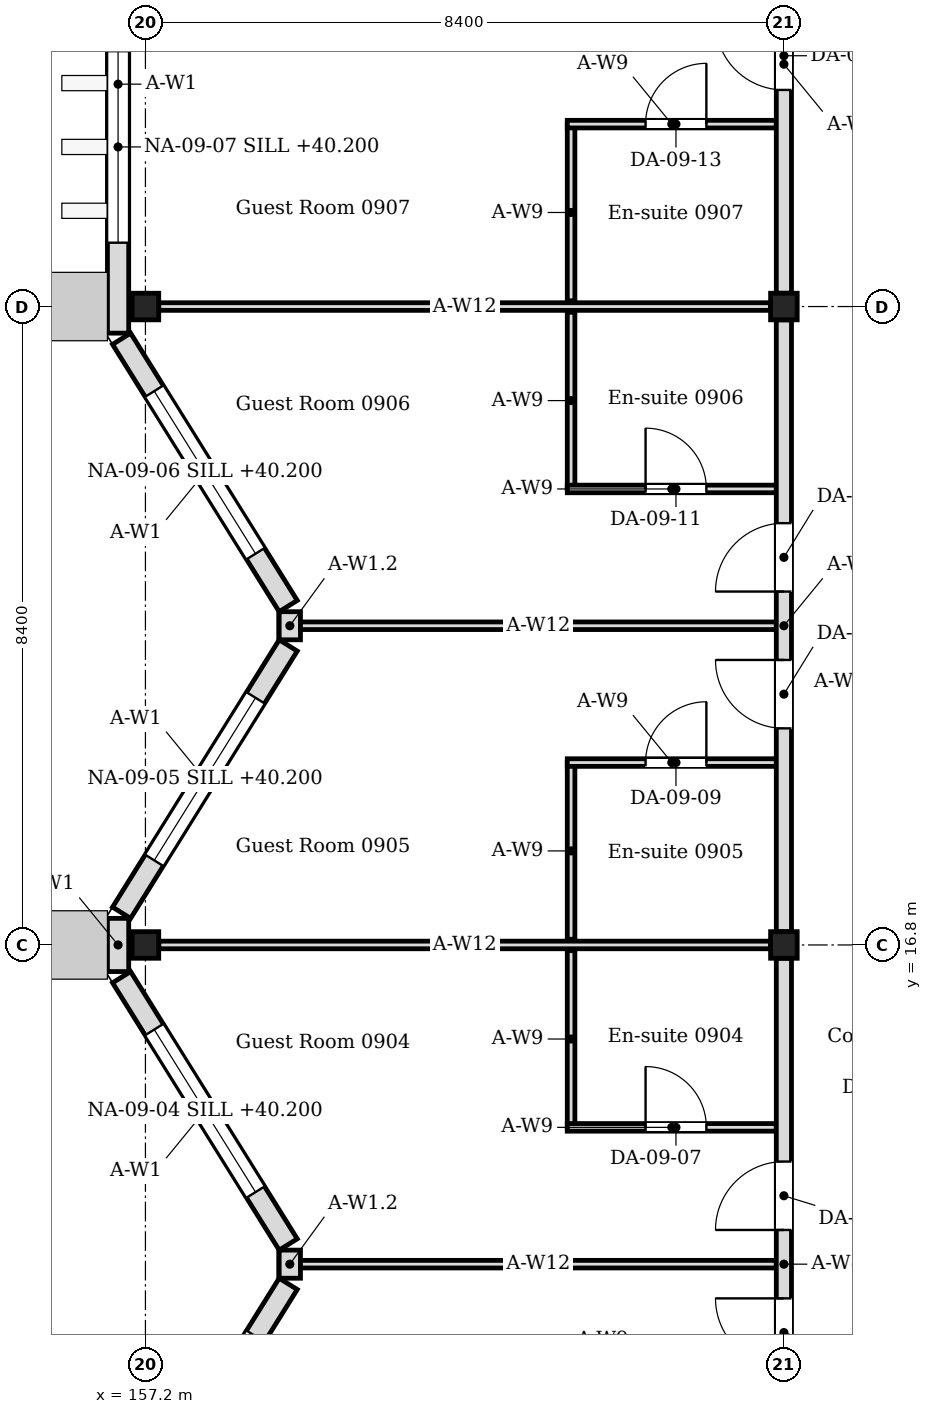
"""IFC4 building model, lengths in metres.
Left out: names, types, materials, properties, quantities, classifications, styles, units other than length and angle.
Written with IfcOpenShell. Run it as: python <this file> out.ifc"""

import sys

from ifc_helpers import new_model, si_unit, direction, frame, frame_2d, origin, origin_2d, place, context, subcontext, project, spatial, rectangle, i_section, extrude, element, fill, save


model = new_model("IFC4")
c1 = context("Model", 3, precision=1e-05, world=origin(), true_north=direction((0.0, 1.0)))
c2 = subcontext(c1, "Body", "Model", "MODEL_VIEW")
j1 = project(units=[si_unit("LENGTHUNIT", "METRE"), si_unit("PLANEANGLEUNIT", "RADIAN")], contexts=[c1])
p1 = place(None, origin())
s1 = spatial("IfcSite", under=j1, at=p1, CompositionType="ELEMENT")
p2 = place(p1, origin())
s2 = spatial("IfcBuilding", under=s1, at=p2, CompositionType="ELEMENT")
p3 = place(p2, frame((0.0, 0.0, 39.6)))
s3 = spatial("IfcBuildingStorey", under=s2, at=p3, CompositionType="ELEMENT", Elevation=39.6)
for number, where, z_axis, x_axis in (
    (1, (157.2, 16.8, 0.0), (0.0, 0.0, 1.0), (1.0, 0.0, 0.0)),
    (2, (157.2, 25.2, 0.0), (0.0, 0.0, 1.0), (1.0, 0.0, 0.0)),
    (3, (165.6, 16.8, 0.0), (0.0, 0.0, 1.0), (1.0, 0.0, 0.0)),
    (4, (165.6, 25.2, 0.0), (0.0, 0.0, 1.0), (1.0, 0.0, 0.0)),
):
    element("IfcColumn", number, at=place(p3, frame(where, z_axis=z_axis, x_axis=x_axis)), inside=s3, PredefinedType="COLUMN", context=c2, shape_type="SweptSolid", body=[
        extrude(i_section(OverallWidth=0.35, OverallDepth=0.35, WebThickness=0.012, FlangeThickness=0.019, FilletRadius=0.013, at=origin_2d()), origin(), (0.0, 0.0, 1.0), 4.2),
    ])
p4 = place(p3, frame((156.886, 8.824, 0.0), z_axis=(0.0, 0.0, 1.0), x_axis=(0.529018946142, 0.848610013271, 0.0)))
e5 = element("IfcWall", 5, at=p4, inside=s3, PredefinedType="SOLIDWALL", context=c2, shape_type="SweptSolid", body=[
    extrude(rectangle(XDim=4.144, YDim=0.28, at=frame_2d((2.072, 0.0))), origin(), (0.0, 0.0, 1.0), 4.05),
])
p5 = place(p4, frame((0.812, 0.0, 0.6)))
e6 = element("IfcOpeningElement", 6, at=p5, cuts=e5, PredefinedType="OPENING", context=c2, shape_type="SweptSolid", body=[
    extrude(rectangle(XDim=2.52, YDim=2.4, at=frame_2d((1.26, 1.2))), frame((0.0, 0.15, 0.0), z_axis=(0.0, -1.0, 0.0), x_axis=(1.0, 0.0, 0.0)), (0.0, 0.0, 1.0), 0.3),
])
p6 = place(p3, frame((159.079, 12.859, 0.0), z_axis=(0.0, 0.0, 1.0), x_axis=(-0.528992500338, 0.848626498871, 0.0)))
e7 = element("IfcWall", 7, at=p6, inside=s3, PredefinedType="SOLIDWALL", context=c2, shape_type="SweptSolid", body=[
    extrude(rectangle(XDim=4.145, YDim=0.28, at=frame_2d((2.072, 0.0))), origin(), (0.0, 0.0, 1.0), 4.05),
])
p7 = place(p6, frame((0.812, 0.0, 0.6)))
e8 = element("IfcOpeningElement", 8, at=p7, cuts=e7, PredefinedType="OPENING", context=c2, shape_type="SweptSolid", body=[
    extrude(rectangle(XDim=2.52, YDim=2.4, at=frame_2d((1.26, 1.2))), frame((0.0, 0.15, 0.0), z_axis=(0.0, -1.0, 0.0), x_axis=(1.0, 0.0, 0.0)), (0.0, 0.0, 1.0), 0.3),
])
p8 = place(p3, frame((159.1, 12.415, 0.0), z_axis=(0.0, 0.0, 1.0), x_axis=(0.0, 1.0, 0.0)))
e9 = element("IfcWall", 9, at=p8, inside=s3, PredefinedType="SOLIDWALL", context=c2, shape_type="SweptSolid", body=[
    extrude(rectangle(XDim=0.37, YDim=0.28, at=frame_2d((0.185, 0.0))), origin(), (0.0, 0.0, 1.0), 3.604),
])
p9 = place(p3, frame((156.84, 16.45, 0.0), z_axis=(0.0, 0.0, 1.0), x_axis=(0.0, 1.0, 0.0)))
e10 = element("IfcWall", 10, at=p9, inside=s3, PredefinedType="SOLIDWALL", context=c2, shape_type="SweptSolid", body=[
    extrude(rectangle(XDim=0.7, YDim=0.28, at=frame_2d((0.35, 0.0))), origin(), (0.0, 0.0, 1.0), 4.05),
])
p10 = place(p3, frame((156.886, 17.224, 0.0), z_axis=(0.0, 0.0, 1.0), x_axis=(0.529018946142, 0.848610013271, 0.0)))
e11 = element("IfcWall", 11, at=p10, inside=s3, PredefinedType="SOLIDWALL", context=c2, shape_type="SweptSolid", body=[
    extrude(rectangle(XDim=4.144, YDim=0.28, at=frame_2d((2.072, 0.0))), origin(), (0.0, 0.0, 1.0), 4.05),
])
p11 = place(p10, frame((0.812, 0.0, 0.6)))
e12 = element("IfcOpeningElement", 12, at=p11, cuts=e11, PredefinedType="OPENING", context=c2, shape_type="SweptSolid", body=[
    extrude(rectangle(XDim=2.52, YDim=2.4, at=frame_2d((1.26, 1.2))), frame((0.0, 0.15, 0.0), z_axis=(0.0, -1.0, 0.0), x_axis=(1.0, 0.0, 0.0)), (0.0, 0.0, 1.0), 0.3),
])
p12 = place(p3, frame((159.079, 21.259, 0.0), z_axis=(0.0, 0.0, 1.0), x_axis=(-0.529018946142, 0.848610013271, 0.0)))
e13 = element("IfcWall", 13, at=p12, inside=s3, PredefinedType="SOLIDWALL", context=c2, shape_type="SweptSolid", body=[
    extrude(rectangle(XDim=4.144, YDim=0.28, at=frame_2d((2.072, 0.0))), origin(), (0.0, 0.0, 1.0), 4.05),
])
p13 = place(p12, frame((0.812, 0.0, 0.6)))
e14 = element("IfcOpeningElement", 14, at=p13, cuts=e13, PredefinedType="OPENING", context=c2, shape_type="SweptSolid", body=[
    extrude(rectangle(XDim=2.52, YDim=2.4, at=frame_2d((1.26, 1.2))), frame((0.0, 0.15, 0.0), z_axis=(0.0, -1.0, 0.0), x_axis=(1.0, 0.0, 0.0)), (0.0, 0.0, 1.0), 0.3),
])
p14 = place(p3, frame((159.1, 20.815, 0.0), z_axis=(0.0, 0.0, 1.0), x_axis=(0.0, 1.0, 0.0)))
e15 = element("IfcWall", 15, at=p14, inside=s3, PredefinedType="SOLIDWALL", context=c2, shape_type="SweptSolid", body=[
    extrude(rectangle(XDim=0.37, YDim=0.28, at=frame_2d((0.185, 0.0))), origin(), (0.0, 0.0, 1.0), 3.604),
])
p15 = place(p3, frame((156.84, 24.85, 0.0), z_axis=(0.0, 0.0, 1.0), x_axis=(0.0, 1.0, 0.0)))
e16 = element("IfcWall", 16, at=p15, inside=s3, PredefinedType="SOLIDWALL", context=c2, shape_type="SweptSolid", body=[
    extrude(rectangle(XDim=9.1, YDim=0.28, at=frame_2d((4.55, 0.0))), origin(), (0.0, 0.0, 1.0), 4.05),
])
p16 = place(p15, frame((1.19, 0.0, 0.6)))
e17 = element("IfcOpeningElement", 17, at=p16, cuts=e16, PredefinedType="OPENING", context=c2, shape_type="SweptSolid", body=[
    extrude(rectangle(XDim=2.52, YDim=2.4, at=frame_2d((1.26, 1.2))), frame((0.0, 0.15, 0.0), z_axis=(0.0, -1.0, 0.0), x_axis=(1.0, 0.0, 0.0)), (0.0, 0.0, 1.0), 0.3),
])
p17 = place(p15, frame((5.39, 0.0, 0.6)))
e18 = element("IfcOpeningElement", 18, at=p17, cuts=e16, PredefinedType="OPENING", context=c2, shape_type="SweptSolid", body=[
    extrude(rectangle(XDim=2.52, YDim=2.4, at=frame_2d((1.26, 1.2))), frame((0.0, 0.15, 0.0), z_axis=(0.0, -1.0, 0.0), x_axis=(1.0, 0.0, 0.0)), (0.0, 0.0, 1.0), 0.3),
])
p18 = place(p3, frame((162.8, 14.4, 0.0), z_axis=(0.0, 0.0, 1.0), x_axis=(0.0, 1.0, 0.0)))
e19 = element("IfcWall", 19, at=p18, inside=s3, PredefinedType="PARTITIONING", context=c2, shape_type="SweptSolid", body=[
    extrude(rectangle(XDim=2.325, YDim=0.1, at=frame_2d((1.163, 0.0))), origin(), (0.0, 0.0, 1.0), 4.05),
])
p19 = place(p3, frame((162.75, 14.4, 0.0), z_axis=(0.0, 0.0, 1.0), x_axis=(1.0, 0.0, 0.0)))
e20 = element("IfcWall", 20, at=p19, inside=s3, PredefinedType="PARTITIONING", context=c2, shape_type="SweptSolid", body=[
    extrude(rectangle(XDim=2.75, YDim=0.1, at=frame_2d((1.375, 0.0))), origin(), (0.0, 0.0, 1.0), 4.05),
])
p20 = place(p19, frame((1.03, 0.0, 0.0)))
e21 = element("IfcOpeningElement", 21, at=p20, cuts=e20, PredefinedType="OPENING", context=c2, shape_type="SweptSolid", body=[
    extrude(rectangle(XDim=0.8, YDim=2.1, at=frame_2d((0.4, 1.05))), frame((0.0, 0.06, 0.0), z_axis=(0.0, -1.0, 0.0), x_axis=(1.0, 0.0, 0.0)), (0.0, 0.0, 1.0), 0.12),
])
p21 = place(p3, frame((162.8, 16.875, 0.0), z_axis=(0.0, 0.0, 1.0), x_axis=(0.0, 1.0, 0.0)))
e22 = element("IfcWall", 22, at=p21, inside=s3, PredefinedType="PARTITIONING", context=c2, shape_type="SweptSolid", body=[
    extrude(rectangle(XDim=2.325, YDim=0.1, at=frame_2d((1.163, 0.0))), origin(), (0.0, 0.0, 1.0), 4.05),
])
p22 = place(p3, frame((162.75, 19.2, 0.0), z_axis=(0.0, 0.0, 1.0), x_axis=(1.0, 0.0, 0.0)))
e23 = element("IfcWall", 23, at=p22, inside=s3, PredefinedType="PARTITIONING", context=c2, shape_type="SweptSolid", body=[
    extrude(rectangle(XDim=2.75, YDim=0.1, at=frame_2d((1.375, 0.0))), origin(), (0.0, 0.0, 1.0), 4.05),
])
p23 = place(p22, frame((1.03, 0.0, 0.0)))
e24 = element("IfcOpeningElement", 24, at=p23, cuts=e23, PredefinedType="OPENING", context=c2, shape_type="SweptSolid", body=[
    extrude(rectangle(XDim=0.8, YDim=2.1, at=frame_2d((0.4, 1.05))), frame((0.0, 0.06, 0.0), z_axis=(0.0, -1.0, 0.0), x_axis=(1.0, 0.0, 0.0)), (0.0, 0.0, 1.0), 0.12),
])
p24 = place(p3, frame((162.8, 22.8, 0.0), z_axis=(0.0, 0.0, 1.0), x_axis=(0.0, 1.0, 0.0)))
e25 = element("IfcWall", 25, at=p24, inside=s3, PredefinedType="PARTITIONING", context=c2, shape_type="SweptSolid", body=[
    extrude(rectangle(XDim=2.325, YDim=0.1, at=frame_2d((1.163, 0.0))), origin(), (0.0, 0.0, 1.0), 4.05),
])
p25 = place(p3, frame((162.75, 22.8, 0.0), z_axis=(0.0, 0.0, 1.0), x_axis=(1.0, 0.0, 0.0)))
e26 = element("IfcWall", 26, at=p25, inside=s3, PredefinedType="PARTITIONING", context=c2, shape_type="SweptSolid", body=[
    extrude(rectangle(XDim=2.75, YDim=0.1, at=frame_2d((1.375, 0.0))), origin(), (0.0, 0.0, 1.0), 4.05),
])
p26 = place(p25, frame((1.03, 0.0, 0.0)))
e27 = element("IfcOpeningElement", 27, at=p26, cuts=e26, PredefinedType="OPENING", context=c2, shape_type="SweptSolid", body=[
    extrude(rectangle(XDim=0.8, YDim=2.1, at=frame_2d((0.4, 1.05))), frame((0.0, 0.06, 0.0), z_axis=(0.0, -1.0, 0.0), x_axis=(1.0, 0.0, 0.0)), (0.0, 0.0, 1.0), 0.12),
])
p27 = place(p3, frame((162.8, 25.275, 0.0), z_axis=(0.0, 0.0, 1.0), x_axis=(0.0, 1.0, 0.0)))
e28 = element("IfcWall", 28, at=p27, inside=s3, PredefinedType="PARTITIONING", context=c2, shape_type="SweptSolid", body=[
    extrude(rectangle(XDim=2.325, YDim=0.1, at=frame_2d((1.163, 0.0))), origin(), (0.0, 0.0, 1.0), 4.05),
])
p28 = place(p3, frame((162.75, 27.6, 0.0), z_axis=(0.0, 0.0, 1.0), x_axis=(1.0, 0.0, 0.0)))
e29 = element("IfcWall", 29, at=p28, inside=s3, PredefinedType="PARTITIONING", context=c2, shape_type="SweptSolid", body=[
    extrude(rectangle(XDim=2.75, YDim=0.1, at=frame_2d((1.375, 0.0))), origin(), (0.0, 0.0, 1.0), 4.05),
])
p29 = place(p28, frame((1.03, 0.0, 0.0)))
e30 = element("IfcOpeningElement", 30, at=p29, cuts=e29, PredefinedType="OPENING", context=c2, shape_type="SweptSolid", body=[
    extrude(rectangle(XDim=0.8, YDim=2.1, at=frame_2d((0.4, 1.05))), frame((0.0, 0.06, 0.0), z_axis=(0.0, -1.0, 0.0), x_axis=(1.0, 0.0, 0.0)), (0.0, 0.0, 1.0), 0.12),
])
for number, where, z_axis, x_axis in (
    (31, (157.375, 16.8, 0.0), (0.0, 0.0, 1.0), (1.0, 0.0, 0.0)),
    (32, (157.375, 25.2, 0.0), (0.0, 0.0, 1.0), (1.0, 0.0, 0.0)),
):
    element("IfcWall", number, at=place(p3, frame(where, z_axis=z_axis, x_axis=x_axis)), inside=s3, PredefinedType="PARTITIONING", context=c2, shape_type="SweptSolid", body=[
        extrude(rectangle(XDim=8.05, YDim=0.1, at=frame_2d((4.025, 0.0))), origin(), (0.0, 0.0, 1.0), 3.604),
    ])
for number, where, z_axis, x_axis in (
    (33, (159.24, 12.6, 0.0), (0.0, 0.0, 1.0), (1.0, 0.0, 0.0)),
    (34, (159.24, 21.0, 0.0), (0.0, 0.0, 1.0), (1.0, 0.0, 0.0)),
):
    element("IfcWall", number, at=place(p3, frame(where, z_axis=z_axis, x_axis=x_axis)), inside=s3, PredefinedType="PARTITIONING", context=c2, shape_type="SweptSolid", body=[
        extrude(rectangle(XDim=6.26, YDim=0.1, at=frame_2d((3.13, 0.0))), origin(), (0.0, 0.0, 1.0), 3.604),
    ])
p30 = place(p3, frame((165.6, 8.575, 0.0), z_axis=(0.0, 0.0, 1.0), x_axis=(0.0, 1.0, 0.0)))
e35 = element("IfcWall", 35, at=p30, inside=s3, PredefinedType="PARTITIONING", context=c2, shape_type="SweptSolid", body=[
    extrude(rectangle(XDim=8.05, YDim=0.2, at=frame_2d((4.025, 0.0))), origin(), (0.0, 0.0, 1.0), 3.45),
])
p31 = place(p30, frame((2.675, 0.0, 0.0)))
e36 = element("IfcOpeningElement", 36, at=p31, cuts=e35, PredefinedType="OPENING", context=c2, shape_type="SweptSolid", body=[
    extrude(rectangle(XDim=0.9, YDim=2.1, at=frame_2d((0.45, 1.05))), frame((0.0, 0.11, 0.0), z_axis=(0.0, -1.0, 0.0), x_axis=(1.0, 0.0, 0.0)), (0.0, 0.0, 1.0), 0.22),
])
p32 = place(p30, frame((4.475, 0.0, 0.0)))
e37 = element("IfcOpeningElement", 37, at=p32, cuts=e35, PredefinedType="OPENING", context=c2, shape_type="SweptSolid", body=[
    extrude(rectangle(XDim=0.9, YDim=2.1, at=frame_2d((0.45, 1.05))), frame((0.0, 0.11, 0.0), z_axis=(0.0, -1.0, 0.0), x_axis=(1.0, 0.0, 0.0)), (0.0, 0.0, 1.0), 0.22),
])
p33 = place(p3, frame((165.6, 16.975, 0.0), z_axis=(0.0, 0.0, 1.0), x_axis=(0.0, 1.0, 0.0)))
e38 = element("IfcWall", 38, at=p33, inside=s3, PredefinedType="PARTITIONING", context=c2, shape_type="SweptSolid", body=[
    extrude(rectangle(XDim=8.05, YDim=0.2, at=frame_2d((4.025, 0.0))), origin(), (0.0, 0.0, 1.0), 3.45),
])
p34 = place(p33, frame((2.675, 0.0, 0.0)))
e39 = element("IfcOpeningElement", 39, at=p34, cuts=e38, PredefinedType="OPENING", context=c2, shape_type="SweptSolid", body=[
    extrude(rectangle(XDim=0.9, YDim=2.1, at=frame_2d((0.45, 1.05))), frame((0.0, 0.11, 0.0), z_axis=(0.0, -1.0, 0.0), x_axis=(1.0, 0.0, 0.0)), (0.0, 0.0, 1.0), 0.22),
])
p35 = place(p33, frame((4.475, 0.0, 0.0)))
e40 = element("IfcOpeningElement", 40, at=p35, cuts=e38, PredefinedType="OPENING", context=c2, shape_type="SweptSolid", body=[
    extrude(rectangle(XDim=0.9, YDim=2.1, at=frame_2d((0.45, 1.05))), frame((0.0, 0.11, 0.0), z_axis=(0.0, -1.0, 0.0), x_axis=(1.0, 0.0, 0.0)), (0.0, 0.0, 1.0), 0.22),
])
p36 = place(p3, frame((165.6, 25.375, 0.0), z_axis=(0.0, 0.0, 1.0), x_axis=(0.0, 1.0, 0.0)))
e41 = element("IfcWall", 41, at=p36, inside=s3, PredefinedType="PARTITIONING", context=c2, shape_type="SweptSolid", body=[
    extrude(rectangle(XDim=8.05, YDim=0.2, at=frame_2d((4.025, 0.0))), origin(), (0.0, 0.0, 1.0), 3.45),
])
p37 = place(p36, frame((2.675, 0.0, 0.0)))
e42 = element("IfcOpeningElement", 42, at=p37, cuts=e41, PredefinedType="OPENING", context=c2, shape_type="SweptSolid", body=[
    extrude(rectangle(XDim=0.9, YDim=2.1, at=frame_2d((0.45, 1.05))), frame((0.0, 0.11, 0.0), z_axis=(0.0, -1.0, 0.0), x_axis=(1.0, 0.0, 0.0)), (0.0, 0.0, 1.0), 0.22),
])
p38 = place(p36, frame((4.475, 0.0, 0.0)))
e43 = element("IfcOpeningElement", 43, at=p38, cuts=e41, PredefinedType="OPENING", context=c2, shape_type="SweptSolid", body=[
    extrude(rectangle(XDim=0.9, YDim=2.1, at=frame_2d((0.45, 1.05))), frame((0.0, 0.11, 0.0), z_axis=(0.0, -1.0, 0.0), x_axis=(1.0, 0.0, 0.0)), (0.0, 0.0, 1.0), 0.22),
])
p39 = place(p7, origin())
e44 = element("IfcWindow", 44, at=p39, inside=s3, PartitioningType="SINGLE_PANEL", PredefinedType="WINDOW", context=c2, shape_type="SweptSolid", body=[
    extrude(rectangle(XDim=2.52, YDim=2.4, at=frame_2d((1.26, 1.2))), frame((0.0, 0.03, 0.0), z_axis=(0.0, -1.0, 0.0), x_axis=(1.0, 0.0, 0.0)), (0.0, 0.0, 1.0), 0.06),
])
fill(e8, e44)
p40 = place(p11, origin())
e45 = element("IfcWindow", 45, at=p40, inside=s3, PartitioningType="SINGLE_PANEL", PredefinedType="WINDOW", context=c2, shape_type="SweptSolid", body=[
    extrude(rectangle(XDim=2.52, YDim=2.4, at=frame_2d((1.26, 1.2))), frame((0.0, 0.03, 0.0), z_axis=(0.0, -1.0, 0.0), x_axis=(1.0, 0.0, 0.0)), (0.0, 0.0, 1.0), 0.06),
])
fill(e12, e45)
p41 = place(p13, origin())
e46 = element("IfcWindow", 46, at=p41, inside=s3, PartitioningType="SINGLE_PANEL", PredefinedType="WINDOW", context=c2, shape_type="SweptSolid", body=[
    extrude(rectangle(XDim=2.52, YDim=2.4, at=frame_2d((1.26, 1.2))), frame((0.0, 0.03, 0.0), z_axis=(0.0, -1.0, 0.0), x_axis=(1.0, 0.0, 0.0)), (0.0, 0.0, 1.0), 0.06),
])
fill(e14, e46)
p42 = place(p16, origin())
e47 = element("IfcWindow", 47, at=p42, inside=s3, PartitioningType="SINGLE_PANEL", PredefinedType="WINDOW", context=c2, shape_type="SweptSolid", body=[
    extrude(rectangle(XDim=2.52, YDim=2.4, at=frame_2d((1.26, 1.2))), frame((0.0, 0.03, 0.0), z_axis=(0.0, -1.0, 0.0), x_axis=(1.0, 0.0, 0.0)), (0.0, 0.0, 1.0), 0.06),
])
fill(e17, e47)
p43 = place(p31, origin())
e48 = element("IfcDoor", 48, at=p43, inside=s3, OperationType="SINGLE_SWING_RIGHT", PredefinedType="DOOR", context=c2, shape_type="SweptSolid", body=[
    extrude(rectangle(XDim=0.9, YDim=2.1, at=frame_2d((0.45, 1.05))), frame((0.0, 0.025, 0.0), z_axis=(0.0, -1.0, 0.0), x_axis=(1.0, 0.0, 0.0)), (0.0, 0.0, 1.0), 0.05),
])
fill(e36, e48)
p44 = place(p20, origin())
e49 = element("IfcDoor", 49, at=p44, inside=s3, OperationType="SINGLE_SWING_LEFT", PredefinedType="DOOR", context=c2, shape_type="SweptSolid", body=[
    extrude(rectangle(XDim=0.8, YDim=2.1, at=frame_2d((0.4, 1.05))), frame((0.0, 0.025, 0.0), z_axis=(0.0, -1.0, 0.0), x_axis=(1.0, 0.0, 0.0)), (0.0, 0.0, 1.0), 0.05),
])
fill(e21, e49)
p45 = place(p32, origin())
e50 = element("IfcDoor", 50, at=p45, inside=s3, OperationType="SINGLE_SWING_LEFT", PredefinedType="DOOR", context=c2, shape_type="SweptSolid", body=[
    extrude(rectangle(XDim=0.9, YDim=2.1, at=frame_2d((0.45, 1.05))), frame((0.0, 0.025, 0.0), z_axis=(0.0, -1.0, 0.0), x_axis=(1.0, 0.0, 0.0)), (0.0, 0.0, 1.0), 0.05),
])
fill(e37, e50)
p46 = place(p23, origin())
e51 = element("IfcDoor", 51, at=p46, inside=s3, OperationType="SINGLE_SWING_RIGHT", PredefinedType="DOOR", context=c2, shape_type="SweptSolid", body=[
    extrude(rectangle(XDim=0.8, YDim=2.1, at=frame_2d((0.4, 1.05))), frame((0.0, 0.025, 0.0), z_axis=(0.0, -1.0, 0.0), x_axis=(1.0, 0.0, 0.0)), (0.0, 0.0, 1.0), 0.05),
])
fill(e24, e51)
p47 = place(p34, origin())
e52 = element("IfcDoor", 52, at=p47, inside=s3, OperationType="SINGLE_SWING_RIGHT", PredefinedType="DOOR", context=c2, shape_type="SweptSolid", body=[
    extrude(rectangle(XDim=0.9, YDim=2.1, at=frame_2d((0.45, 1.05))), frame((0.0, 0.025, 0.0), z_axis=(0.0, -1.0, 0.0), x_axis=(1.0, 0.0, 0.0)), (0.0, 0.0, 1.0), 0.05),
])
fill(e39, e52)
p48 = place(p26, origin())
e53 = element("IfcDoor", 53, at=p48, inside=s3, OperationType="SINGLE_SWING_LEFT", PredefinedType="DOOR", context=c2, shape_type="SweptSolid", body=[
    extrude(rectangle(XDim=0.8, YDim=2.1, at=frame_2d((0.4, 1.05))), frame((0.0, 0.025, 0.0), z_axis=(0.0, -1.0, 0.0), x_axis=(1.0, 0.0, 0.0)), (0.0, 0.0, 1.0), 0.05),
])
fill(e27, e53)
p49 = place(p35, origin())
e54 = element("IfcDoor", 54, at=p49, inside=s3, OperationType="SINGLE_SWING_LEFT", PredefinedType="DOOR", context=c2, shape_type="SweptSolid", body=[
    extrude(rectangle(XDim=0.9, YDim=2.1, at=frame_2d((0.45, 1.05))), frame((0.0, 0.025, 0.0), z_axis=(0.0, -1.0, 0.0), x_axis=(1.0, 0.0, 0.0)), (0.0, 0.0, 1.0), 0.05),
])
fill(e40, e54)
p50 = place(p29, origin())
e55 = element("IfcDoor", 55, at=p50, inside=s3, OperationType="SINGLE_SWING_RIGHT", PredefinedType="DOOR", context=c2, shape_type="SweptSolid", body=[
    extrude(rectangle(XDim=0.8, YDim=2.1, at=frame_2d((0.4, 1.05))), frame((0.0, 0.025, 0.0), z_axis=(0.0, -1.0, 0.0), x_axis=(1.0, 0.0, 0.0)), (0.0, 0.0, 1.0), 0.05),
])
fill(e30, e55)
p51 = place(p37, origin())
e56 = element("IfcDoor", 56, at=p51, inside=s3, OperationType="SINGLE_SWING_RIGHT", PredefinedType="DOOR", context=c2, shape_type="SweptSolid", body=[
    extrude(rectangle(XDim=0.9, YDim=2.1, at=frame_2d((0.45, 1.05))), frame((0.0, 0.025, 0.0), z_axis=(0.0, -1.0, 0.0), x_axis=(1.0, 0.0, 0.0)), (0.0, 0.0, 1.0), 0.05),
])
fill(e42, e56)
save(model, sys.argv[1])
